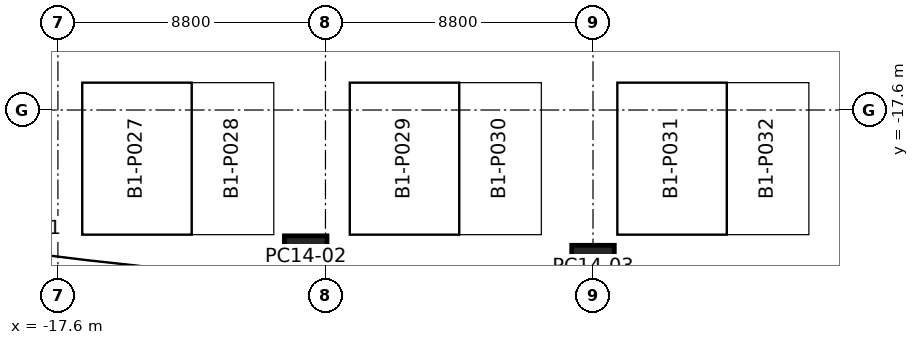
"""IFC4 building model, lengths in metres.
Left out: names, types, materials, properties, quantities, classifications, styles, units other than length and angle.
Written with IfcOpenShell. Run it as: python <this file> out.ifc"""

import sys

from ifc_helpers import new_model, si_unit, direction, frame, origin, origin_2d, place, context, subcontext, project, spatial, rectangle, extrude, element, save


model = new_model("IFC4")
c1 = context("Model", 3, precision=1e-05, world=origin(), true_north=direction((0.0, 1.0)))
c2 = subcontext(c1, "Body", "Model", "MODEL_VIEW")
j1 = project(units=[si_unit("LENGTHUNIT", "METRE"), si_unit("PLANEANGLEUNIT", "RADIAN")], contexts=[c1])
p1 = place(None, origin())
s1 = spatial("IfcSite", under=j1, at=p1, CompositionType="ELEMENT")
p2 = place(p1, origin())
s2 = spatial("IfcBuilding", under=s1, at=p2, CompositionType="ELEMENT")
p3 = place(p2, frame((0.0, 0.0, -4.5)))
s3 = spatial("IfcBuildingStorey", under=s2, at=p3, CompositionType="ELEMENT", Elevation=-4.5)
for number, where, z_axis, x_axis in (
    (1, (-9.45, -22.439, 0.0), (0.0, 0.0, 1.0), (-0.998, 0.066, 0.0)),
    (2, (0.0, -22.75, 0.0), (0.0, 0.0, 1.0), (1.0, 0.0, 0.0)),
):
    element("IfcColumn", number, at=place(p3, frame(where, z_axis=z_axis, x_axis=x_axis)), inside=s3, PredefinedType="COLUMN", context=c2, shape_type="SweptSolid", body=[
        extrude(rectangle(XDim=1.4, YDim=1.4, at=origin_2d()), origin(), (0.0, 0.0, 1.0), 4.5),
    ])
save(model, sys.argv[1])
